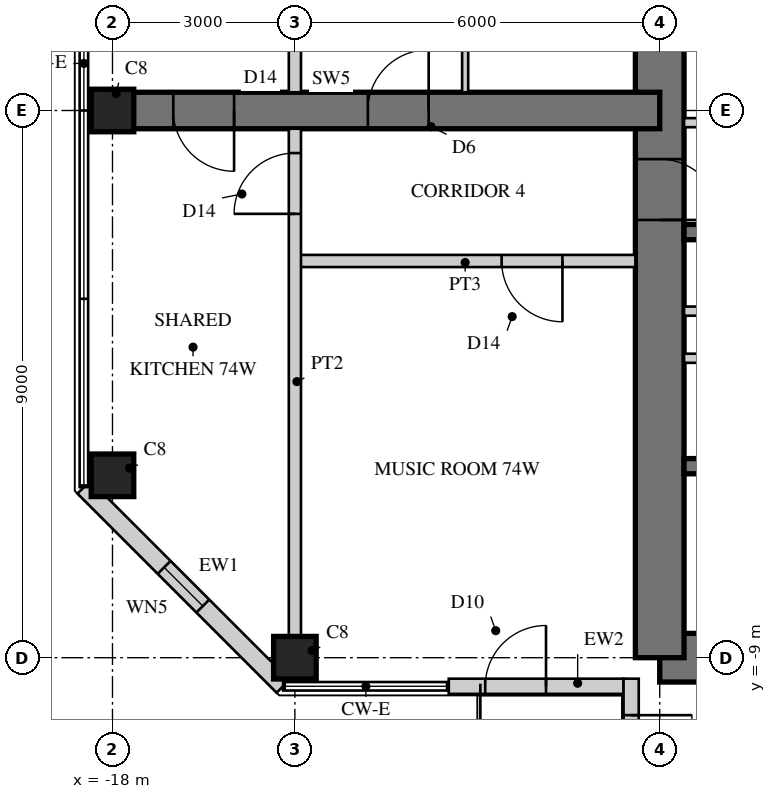
"""IFC4 building model, lengths in metres.
Left out: names, types, materials, properties, quantities, classifications, styles, units other than length and angle.
Written with IfcOpenShell. Run it as: python <this file> out.ifc"""

import sys

from ifc_helpers import new_model, si_unit, direction, frame, frame_2d, origin, origin_2d, place, context, subcontext, project, spatial, rectangle, hollow_rectangle, extrude, element, fill, save


model = new_model("IFC4")
c1 = context("Model", 3, precision=1e-05, world=origin(), true_north=direction((0.0, 1.0)))
c2 = subcontext(c1, "Body", "Model", "MODEL_VIEW")
j1 = project(units=[si_unit("LENGTHUNIT", "METRE"), si_unit("PLANEANGLEUNIT", "RADIAN")], contexts=[c1])
p1 = place(None, origin())
s1 = spatial("IfcSite", under=j1, at=p1, CompositionType="ELEMENT")
p2 = place(p1, origin())
s2 = spatial("IfcBuilding", under=s1, at=p2, CompositionType="ELEMENT")
p3 = place(p2, frame((0.0, 0.0, 284.9)))
s3 = spatial("IfcBuildingStorey", under=s2, at=p3, CompositionType="ELEMENT", Elevation=284.9)
p4 = place(p3, frame((-9.0, -9.0, 0.0), z_axis=(0.0, 0.0, 1.0), x_axis=(1.0, 0.0, 0.0)))
e1 = element("IfcWall", 1, at=p4, inside=s3, PredefinedType="SHEAR", context=c2, shape_type="SweptSolid", body=[
    extrude(rectangle(XDim=18.0, YDim=0.8, at=frame_2d((9.0, 0.0))), origin(), (0.0, 0.0, 1.0), 3.4),
])
p5 = place(p4, frame((9.8, 0.0, 0.0)))
e2 = element("IfcOpeningElement", 2, at=p5, cuts=e1, PredefinedType="OPENING", context=c2, shape_type="SweptSolid", body=[
    extrude(rectangle(XDim=1.0, YDim=2.4, at=frame_2d((0.5, 1.2))), frame((0.0, 0.41, 0.0), z_axis=(0.0, -1.0, 0.0), x_axis=(1.0, 0.0, 0.0)), (0.0, 0.0, 1.0), 0.82),
])
p6 = place(p3, frame((-9.0, 9.0, 0.0), z_axis=(0.0, 0.0, 1.0), x_axis=(0.0, -1.0, 0.0)))
e3 = element("IfcWall", 3, at=p6, inside=s3, PredefinedType="SHEAR", context=c2, shape_type="SweptSolid", body=[
    extrude(rectangle(XDim=18.0, YDim=0.8, at=frame_2d((9.0, 0.0))), origin(), (0.0, 0.0, 1.0), 3.4),
])
p7 = place(p6, frame((9.8, 0.0, 0.0)))
e4 = element("IfcOpeningElement", 4, at=p7, cuts=e3, PredefinedType="OPENING", context=c2, shape_type="SweptSolid", body=[
    extrude(rectangle(XDim=1.0, YDim=2.4, at=frame_2d((0.5, 1.2))), frame((0.0, 0.41, 0.0), z_axis=(0.0, -1.0, 0.0), x_axis=(1.0, 0.0, 0.0)), (0.0, 0.0, 1.0), 0.82),
])
p8 = place(p3, frame((-1.925, -2.0, 0.0), z_axis=(0.0, 0.0, 1.0), x_axis=(-1.0, 0.0, 0.0)))
e5 = element("IfcWall", 5, at=p8, inside=s3, PredefinedType="SHEAR", context=c2, shape_type="SweptSolid", body=[
    extrude(rectangle(XDim=6.675, YDim=0.25, at=frame_2d((3.337, 0.0))), origin(), (0.0, 0.0, 1.0), 3.4),
])
p9 = place(p3, frame((-1.925, -5.85, 0.0), z_axis=(0.0, 0.0, 1.0), x_axis=(-1.0, 0.0, 0.0)))
e6 = element("IfcWall", 6, at=p9, inside=s3, PredefinedType="SHEAR", context=c2, shape_type="SweptSolid", body=[
    extrude(rectangle(XDim=6.675, YDim=0.25, at=frame_2d((3.337, 0.0))), origin(), (0.0, 0.0, 1.0), 3.4),
])
p10 = place(p9, frame((0.496, 0.0, 0.0)))
e7 = element("IfcOpeningElement", 7, at=p10, cuts=e6, PredefinedType="OPENING", context=c2, shape_type="SweptSolid", body=[
    extrude(rectangle(XDim=1.1, YDim=2.2, at=frame_2d((0.55, 1.1))), frame((0.0, 0.135, 0.0), z_axis=(0.0, -1.0, 0.0), x_axis=(1.0, 0.0, 0.0)), (0.0, 0.0, 1.0), 0.27),
])
p11 = place(p9, frame((2.788, 0.0, 0.0)))
e8 = element("IfcOpeningElement", 8, at=p11, cuts=e6, PredefinedType="OPENING", context=c2, shape_type="SweptSolid", body=[
    extrude(rectangle(XDim=1.1, YDim=2.2, at=frame_2d((0.55, 1.1))), frame((0.0, 0.135, 0.0), z_axis=(0.0, -1.0, 0.0), x_axis=(1.0, 0.0, 0.0)), (0.0, 0.0, 1.0), 0.27),
])
p12 = place(p9, frame((5.079, 0.0, 0.0)))
e9 = element("IfcOpeningElement", 9, at=p12, cuts=e6, PredefinedType="OPENING", context=c2, shape_type="SweptSolid", body=[
    extrude(rectangle(XDim=1.1, YDim=2.2, at=frame_2d((0.55, 1.1))), frame((0.0, 0.135, 0.0), z_axis=(0.0, -1.0, 0.0), x_axis=(1.0, 0.0, 0.0)), (0.0, 0.0, 1.0), 0.27),
])
p13 = place(p3, frame((-1.925, -3.3, 0.0), z_axis=(0.0, 0.0, 1.0), x_axis=(-1.0, 0.0, 0.0)))
e10 = element("IfcWall", 10, at=p13, inside=s3, PredefinedType="PARTITIONING", context=c2, shape_type="SweptSolid", body=[
    extrude(rectangle(XDim=6.675, YDim=0.15, at=frame_2d((3.337, 0.0))), origin(), (0.0, 0.0, 1.0), 3.4),
])
p14 = place(p13, frame((0.075, 0.0, 0.0)))
e11 = element("IfcOpeningElement", 11, at=p14, cuts=e10, PredefinedType="OPENING", context=c2, shape_type="SweptSolid", body=[
    extrude(rectangle(XDim=0.8, YDim=2.1, at=frame_2d((0.4, 1.05))), frame((0.0, 0.085, 0.0), z_axis=(0.0, -1.0, 0.0), x_axis=(1.0, 0.0, 0.0)), (0.0, 0.0, 1.0), 0.17),
])
p15 = place(p13, frame((3.675, 0.0, 0.0)))
e12 = element("IfcOpeningElement", 12, at=p15, cuts=e10, PredefinedType="OPENING", context=c2, shape_type="SweptSolid", body=[
    extrude(rectangle(XDim=0.8, YDim=2.1, at=frame_2d((0.4, 1.05))), frame((0.0, 0.085, 0.0), z_axis=(0.0, -1.0, 0.0), x_axis=(1.0, 0.0, 0.0)), (0.0, 0.0, 1.0), 0.17),
])
p16 = place(p3, frame((-9.0, 0.0, 0.0), z_axis=(0.0, 0.0, 1.0), x_axis=(-1.0, 0.0, 0.0)))
e13 = element("IfcWall", 13, at=p16, inside=s3, PredefinedType="SHEAR", context=c2, shape_type="SweptSolid", body=[
    extrude(rectangle(XDim=9.0, YDim=0.6, at=frame_2d((4.5, 0.0))), origin(), (0.0, 0.0, 1.0), 3.4),
])
p17 = place(p16, frame((3.8, 0.0, 0.0)))
e14 = element("IfcOpeningElement", 14, at=p17, cuts=e13, PredefinedType="OPENING", context=c2, shape_type="SweptSolid", body=[
    extrude(rectangle(XDim=1.0, YDim=2.15, at=frame_2d((0.5, 1.075))), frame((0.0, 0.31, 0.0), z_axis=(0.0, -1.0, 0.0), x_axis=(1.0, 0.0, 0.0)), (0.0, 0.0, 1.0), 0.62),
])
p18 = place(p16, frame((7.0, 0.0, 0.0)))
e15 = element("IfcOpeningElement", 15, at=p18, cuts=e13, PredefinedType="OPENING", context=c2, shape_type="SweptSolid", body=[
    extrude(rectangle(XDim=1.0, YDim=2.2, at=frame_2d((0.5, 1.1))), frame((0.0, 0.31, 0.0), z_axis=(0.0, -1.0, 0.0), x_axis=(1.0, 0.0, 0.0)), (0.0, 0.0, 1.0), 0.62),
])
for number, where, z_axis, x_axis in (
    (16, (-15.0, -9.0, 0.0), (0.0, 0.0, 1.0), (1.0, 0.0, 0.0)),
    (17, (-18.0, 0.0, 0.0), (0.0, 0.0, 1.0), (1.0, 0.0, 0.0)),
    (18, (-18.0, -6.0, 0.0), (0.0, 0.0, 1.0), (1.0, 0.0, 0.0)),
):
    element("IfcColumn", number, at=place(p3, frame(where, z_axis=z_axis, x_axis=x_axis)), inside=s3, PredefinedType="COLUMN", context=c2, shape_type="SweptSolid", body=[
        extrude(rectangle(XDim=0.7, YDim=0.7, at=origin_2d()), origin(), (0.0, 0.0, 1.0), 3.4),
    ])
p19 = place(p3, frame((-18.47, -6.195, 0.0), z_axis=(0.0, 0.0, 1.0), x_axis=(0.707106781187, -0.707106781187, 0.0)))
e19 = element("IfcWall", 19, at=p19, inside=s3, PredefinedType="SOLIDWALL", context=c2, shape_type="SweptSolid", body=[
    extrude(rectangle(XDim=4.632, YDim=0.3, at=frame_2d((2.316, 0.0))), origin(), (0.0, 0.0, 1.0), 3.2),
])
p20 = place(p19, frame((1.866, 0.0, 0.3)))
e20 = element("IfcOpeningElement", 20, at=p20, cuts=e19, PredefinedType="OPENING", context=c2, shape_type="SweptSolid", body=[
    extrude(rectangle(XDim=0.9, YDim=2.4, at=frame_2d((0.45, 1.2))), frame((0.0, 0.16, 0.0), z_axis=(0.0, -1.0, 0.0), x_axis=(1.0, 0.0, 0.0)), (0.0, 0.0, 1.0), 0.32),
])
p21 = place(p3, frame((-12.47, -9.47, 0.0), z_axis=(0.0, 0.0, 1.0), x_axis=(1.0, 0.0, 0.0)))
e21 = element("IfcWall", 21, at=p21, inside=s3, PredefinedType="SOLIDWALL", context=c2, shape_type="SweptSolid", body=[
    extrude(rectangle(XDim=2.875, YDim=0.25, at=frame_2d((1.438, 0.0))), origin(), (0.0, 0.0, 1.0), 3.2),
])
p22 = place(p21, frame((0.6, 0.0, 0.0)))
e22 = element("IfcOpeningElement", 22, at=p22, cuts=e21, PredefinedType="OPENING", context=c2, shape_type="SweptSolid", body=[
    extrude(rectangle(XDim=1.0, YDim=2.2, at=frame_2d((0.5, 1.1))), frame((0.0, 0.135, 0.0), z_axis=(0.0, -1.0, 0.0), x_axis=(1.0, 0.0, 0.0)), (0.0, 0.0, 1.0), 0.27),
])
p23 = place(p3, frame((-9.47, -9.345, 0.0), z_axis=(0.0, 0.0, 1.0), x_axis=(0.0, -1.0, 0.0)))
e23 = element("IfcWall", 23, at=p23, inside=s3, PredefinedType="SOLIDWALL", context=c2, shape_type="SweptSolid", body=[
    extrude(rectangle(XDim=3.125, YDim=0.25, at=frame_2d((1.562, 0.0))), origin(), (0.0, 0.0, 1.0), 3.2),
])
p24 = place(p23, frame((0.6, 0.0, 0.0)))
e24 = element("IfcOpeningElement", 24, at=p24, cuts=e23, PredefinedType="OPENING", context=c2, shape_type="SweptSolid", body=[
    extrude(rectangle(XDim=1.0, YDim=2.2, at=frame_2d((0.5, 1.1))), frame((0.0, 0.135, 0.0), z_axis=(0.0, -1.0, 0.0), x_axis=(1.0, 0.0, 0.0)), (0.0, 0.0, 1.0), 0.27),
])
p25 = place(p3, frame((-2.325, -0.2, 0.0), z_axis=(0.0, 0.0, 1.0), x_axis=(-1.0, 0.0, 0.0)))
e25 = element("IfcWall", 25, at=p25, inside=s3, PredefinedType="PARTITIONING", context=c2, shape_type="SweptSolid", body=[
    extrude(rectangle(XDim=6.275, YDim=0.15, at=frame_2d((3.138, 0.0))), origin(), (0.0, 0.0, 1.0), 3.2),
])
p26 = place(p25, frame((0.4, 0.0, 0.0)))
e26 = element("IfcOpeningElement", 26, at=p26, cuts=e25, PredefinedType="OPENING", context=c2, shape_type="SweptSolid", body=[
    extrude(rectangle(XDim=1.0, YDim=2.1, at=frame_2d((0.5, 1.05))), frame((0.0, 0.085, 0.0), z_axis=(0.0, -1.0, 0.0), x_axis=(1.0, 0.0, 0.0)), (0.0, 0.0, 1.0), 0.17),
])
p27 = place(p3, frame((-3.325, -4.075, 0.0), z_axis=(0.0, 0.0, 1.0), x_axis=(-1.0, 0.0, 0.0)))
e27 = element("IfcWall", 27, at=p27, inside=s3, PredefinedType="PARTITIONING", context=c2, shape_type="SweptSolid", body=[
    extrude(rectangle(XDim=5.275, YDim=0.15, at=frame_2d((2.638, 0.0))), origin(), (0.0, 0.0, 1.0), 3.2),
])
p28 = place(p27, frame((2.137, 0.0, 0.0)))
e28 = element("IfcOpeningElement", 28, at=p28, cuts=e27, PredefinedType="OPENING", context=c2, shape_type="SweptSolid", body=[
    extrude(rectangle(XDim=1.0, YDim=2.1, at=frame_2d((0.5, 1.05))), frame((0.0, 0.085, 0.0), z_axis=(0.0, -1.0, 0.0), x_axis=(1.0, 0.0, 0.0)), (0.0, 0.0, 1.0), 0.17),
])
p29 = place(p3, frame((-12.2, 2.9, 0.0), z_axis=(0.0, 0.0, 1.0), x_axis=(0.0, -1.0, 0.0)))
e29 = element("IfcWall", 29, at=p29, inside=s3, PredefinedType="PARTITIONING", context=c2, shape_type="SweptSolid", body=[
    extrude(rectangle(XDim=2.6, YDim=0.1, at=frame_2d((1.3, 0.0))), origin(), (0.0, 0.0, 1.0), 3.2),
])
p30 = place(p29, frame((0.55, 0.0, 0.0)))
e30 = element("IfcOpeningElement", 30, at=p30, cuts=e29, PredefinedType="OPENING", context=c2, shape_type="SweptSolid", body=[
    extrude(rectangle(XDim=0.9, YDim=2.1, at=frame_2d((0.45, 1.05))), frame((0.0, 0.06, 0.0), z_axis=(0.0, -1.0, 0.0), x_axis=(1.0, 0.0, 0.0)), (0.0, 0.0, 1.0), 0.12),
])
p31 = place(p3, frame((-9.4, -2.475, 0.0), z_axis=(0.0, 0.0, 1.0), x_axis=(-1.0, 0.0, 0.0)))
e31 = element("IfcWall", 31, at=p31, inside=s3, PredefinedType="SOLIDWALL", context=c2, shape_type="SweptSolid", body=[
    extrude(rectangle(XDim=5.6, YDim=0.2, at=frame_2d((2.8, 0.0))), origin(), (0.0, 0.0, 1.0), 3.2),
])
p32 = place(p31, frame((1.2, 0.0, 0.0)))
e32 = element("IfcOpeningElement", 32, at=p32, cuts=e31, PredefinedType="OPENING", context=c2, shape_type="SweptSolid", body=[
    extrude(rectangle(XDim=1.0, YDim=2.2, at=frame_2d((0.5, 1.1))), frame((0.0, 0.11, 0.0), z_axis=(0.0, -1.0, 0.0), x_axis=(1.0, 0.0, 0.0)), (0.0, 0.0, 1.0), 0.22),
])
p33 = place(p3, frame((-15.0, 8.65, 0.0), z_axis=(0.0, 0.0, 1.0), x_axis=(0.0, -1.0, 0.0)))
e33 = element("IfcWall", 33, at=p33, inside=s3, PredefinedType="SOLIDWALL", context=c2, shape_type="SweptSolid", body=[
    extrude(rectangle(XDim=8.35, YDim=0.2, at=frame_2d((4.175, 0.0))), origin(), (0.0, 0.0, 1.0), 2.5),
])
p34 = place(p3, frame((-15.0, -0.3, 0.0), z_axis=(0.0, 0.0, 1.0), x_axis=(0.0, -1.0, 0.0)))
e34 = element("IfcWall", 34, at=p34, inside=s3, PredefinedType="SOLIDWALL", context=c2, shape_type="SweptSolid", body=[
    extrude(rectangle(XDim=8.35, YDim=0.2, at=frame_2d((4.175, 0.0))), origin(), (0.0, 0.0, 1.0), 2.5),
])
p35 = place(p34, frame((0.4, 0.0, 0.0)))
e35 = element("IfcOpeningElement", 35, at=p35, cuts=e34, PredefinedType="OPENING", context=c2, shape_type="SweptSolid", body=[
    extrude(rectangle(XDim=1.0, YDim=2.2, at=frame_2d((0.5, 1.1))), frame((0.0, 0.11, 0.0), z_axis=(0.0, -1.0, 0.0), x_axis=(1.0, 0.0, 0.0)), (0.0, 0.0, 1.0), 0.22),
])
p36 = place(p20, origin())
e36 = element("IfcWindow", 36, at=p36, inside=s3, PartitioningType="SINGLE_PANEL", PredefinedType="WINDOW", context=c2, shape_type="SweptSolid", body=[
    extrude(hollow_rectangle(XDim=0.9, YDim=2.4, WallThickness=0.06, at=frame_2d((0.45, 1.2))), frame((0.0, 0.03, 0.0), z_axis=(0.0, -1.0, 0.0), x_axis=(1.0, 0.0, 0.0)), (0.0, 0.0, 1.0), 0.06),
    extrude(rectangle(XDim=0.779, YDim=2.279, at=frame_2d((0.45, 1.2))), frame((0.0, 0.03, 0.0), z_axis=(0.0, -1.0, 0.0), x_axis=(1.0, 0.0, 0.0)), (0.0, 0.0, 1.0), 0.06),
])
fill(e20, e36)
p37 = place(p22, origin())
e37 = element("IfcDoor", 37, at=p37, inside=s3, OperationType="SINGLE_SWING_RIGHT", PredefinedType="DOOR", context=c2, shape_type="SweptSolid", body=[
    extrude(hollow_rectangle(XDim=1.0, YDim=2.2, WallThickness=0.06, at=frame_2d((0.5, 1.1))), frame((0.0, 0.025, 0.0), z_axis=(0.0, -1.0, 0.0), x_axis=(1.0, 0.0, 0.0)), (0.0, 0.0, 1.0), 0.05),
    extrude(rectangle(XDim=0.879, YDim=2.079, at=frame_2d((0.5, 1.1))), frame((0.0, 0.025, 0.0), z_axis=(0.0, -1.0, 0.0), x_axis=(1.0, 0.0, 0.0)), (0.0, 0.0, 1.0), 0.05),
])
fill(e22, e37)
p38 = place(p24, origin())
e38 = element("IfcDoor", 38, at=p38, inside=s3, OperationType="SINGLE_SWING_LEFT", PredefinedType="DOOR", context=c2, shape_type="SweptSolid", body=[
    extrude(hollow_rectangle(XDim=1.0, YDim=2.2, WallThickness=0.06, at=frame_2d((0.5, 1.1))), frame((0.0, 0.025, 0.0), z_axis=(0.0, -1.0, 0.0), x_axis=(1.0, 0.0, 0.0)), (0.0, 0.0, 1.0), 0.05),
    extrude(rectangle(XDim=0.879, YDim=2.079, at=frame_2d((0.5, 1.1))), frame((0.0, 0.025, 0.0), z_axis=(0.0, -1.0, 0.0), x_axis=(1.0, 0.0, 0.0)), (0.0, 0.0, 1.0), 0.05),
])
fill(e24, e38)
p39 = place(p32, origin())
e39 = element("IfcDoor", 39, at=p39, inside=s3, OperationType="SINGLE_SWING_LEFT", PredefinedType="DOOR", context=c2, shape_type="SweptSolid", body=[
    extrude(rectangle(XDim=1.0, YDim=2.2, at=frame_2d((0.5, 1.1))), frame((0.0, 0.025, 0.0), z_axis=(0.0, -1.0, 0.0), x_axis=(1.0, 0.0, 0.0)), (0.0, 0.0, 1.0), 0.05),
])
fill(e32, e39)
p40 = place(p35, frame((1.0, 0.0, 0.0), z_axis=(0.0, 0.0, 1.0), x_axis=(-1.0, 0.0, 0.0)))
e40 = element("IfcDoor", 40, at=p40, inside=s3, OperationType="SINGLE_SWING_LEFT", PredefinedType="DOOR", context=c2, shape_type="SweptSolid", body=[
    extrude(rectangle(XDim=1.0, YDim=2.2, at=frame_2d((0.5, 1.1))), frame((0.0, 0.025, 0.0), z_axis=(0.0, -1.0, 0.0), x_axis=(1.0, 0.0, 0.0)), (0.0, 0.0, 1.0), 0.05),
])
fill(e35, e40)
p41 = place(p17, frame((1.0, 0.0, 0.0), z_axis=(0.0, 0.0, 1.0), x_axis=(-1.0, 0.0, 0.0)))
e41 = element("IfcDoor", 41, at=p41, inside=s3, OperationType="SINGLE_SWING_RIGHT", PredefinedType="DOOR", context=c2, shape_type="SweptSolid", body=[
    extrude(rectangle(XDim=1.0, YDim=2.15, at=frame_2d((0.5, 1.075))), frame((0.0, 0.025, 0.0), z_axis=(0.0, -1.0, 0.0), x_axis=(1.0, 0.0, 0.0)), (0.0, 0.0, 1.0), 0.05),
])
fill(e14, e41)
p42 = place(p18, origin())
e42 = element("IfcDoor", 42, at=p42, inside=s3, OperationType="SINGLE_SWING_LEFT", PredefinedType="DOOR", context=c2, shape_type="SweptSolid", body=[
    extrude(rectangle(XDim=1.0, YDim=2.2, at=frame_2d((0.5, 1.1))), frame((0.0, 0.025, 0.0), z_axis=(0.0, -1.0, 0.0), x_axis=(1.0, 0.0, 0.0)), (0.0, 0.0, 1.0), 0.05),
])
fill(e15, e42)
p43 = place(p7, origin())
e43 = element("IfcDoor", 43, at=p43, inside=s3, OperationType="SINGLE_SWING_RIGHT", PredefinedType="DOOR", context=c2, shape_type="SweptSolid", body=[
    extrude(rectangle(XDim=1.0, YDim=2.4, at=frame_2d((0.5, 1.2))), frame((0.0, 0.055, 0.0), z_axis=(0.0, -1.0, 0.0), x_axis=(1.0, 0.0, 0.0)), (0.0, 0.0, 1.0), 0.05),
])
fill(e4, e43)
save(model, sys.argv[1])
